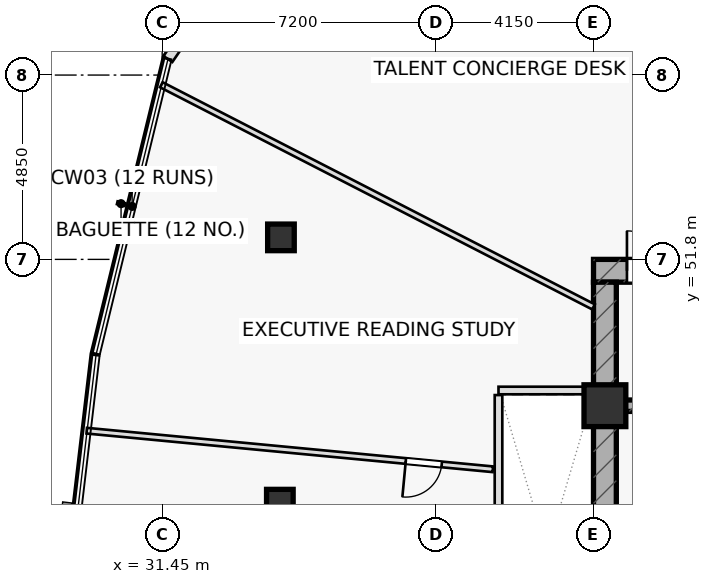
"""IFC4 building model, lengths in metres.
Left out: names, types, materials, properties, quantities, classifications, styles, units other than length and angle.
Written with IfcOpenShell. Run it as: python <this file> out.ifc"""

import sys

from ifc_helpers import new_model, si_unit, direction, frame, frame_2d, origin, origin_2d, place, context, subcontext, project, spatial, rectangle, hollow_rectangle, extrude, element, fill, save


model = new_model("IFC4")
c1 = context("Model", 3, precision=1e-05, world=origin(), true_north=direction((0.0, 1.0)))
c2 = subcontext(c1, "Body", "Model", "MODEL_VIEW")
j1 = project(units=[si_unit("LENGTHUNIT", "METRE"), si_unit("PLANEANGLEUNIT", "RADIAN")], contexts=[c1])
p1 = place(None, origin())
s1 = spatial("IfcSite", under=j1, at=p1, CompositionType="ELEMENT")
p2 = place(p1, origin())
s2 = spatial("IfcBuilding", under=s1, at=p2, CompositionType="ELEMENT")
p3 = place(p2, frame((0.0, 0.0, 115.6)))
s3 = spatial("IfcBuildingStorey", under=s2, at=p3, CompositionType="ELEMENT", Elevation=115.6)
p4 = place(p3, frame((42.8, 51.5, 0.0), z_axis=(0.0, 0.0, 1.0), x_axis=(1.0, 0.0, 0.0)))
e1 = element("IfcWall", 1, at=p4, inside=s3, PredefinedType="SHEAR", context=c2, shape_type="SweptSolid", body=[
    extrude(rectangle(XDim=14.4, YDim=0.6, at=frame_2d((7.2, 0.0))), origin(), (0.0, 0.0, 1.0), 3.55),
])
p5 = place(p4, frame((0.88, 0.0, 0.0)))
e2 = element("IfcOpeningElement", 2, at=p5, cuts=e1, PredefinedType="OPENING", context=c2, shape_type="SweptSolid", body=[
    extrude(rectangle(XDim=1.05, YDim=2.2, at=frame_2d((0.525, 1.1))), frame((0.0, 0.31, 0.0), z_axis=(0.0, -1.0, 0.0), x_axis=(1.0, 0.0, 0.0)), (0.0, 0.0, 1.0), 0.62),
])
p6 = place(p3, frame((43.1, 38.8, 0.0), z_axis=(0.0, 0.0, 1.0), x_axis=(0.0, 1.0, 0.0)))
e3 = element("IfcWall", 3, at=p6, inside=s3, PredefinedType="SHEAR", context=c2, shape_type="SweptSolid", body=[
    extrude(rectangle(XDim=12.4, YDim=0.6, at=frame_2d((6.2, 0.0))), origin(), (0.0, 0.0, 1.0), 3.55),
])
p7 = place(p3, frame((43.4, 47.95, 0.0), z_axis=(0.0, 0.0, 1.0), x_axis=(1.0, 0.0, 0.0)))
e4 = element("IfcWall", 4, at=p7, inside=s3, PredefinedType="SHEAR", context=c2, shape_type="SweptSolid", body=[
    extrude(rectangle(XDim=13.2, YDim=0.3, at=frame_2d((6.6, 0.0))), origin(), (0.0, 0.0, 1.0), 3.55),
])
p8 = place(p7, frame((8.345, 0.0, 0.0)))
e5 = element("IfcOpeningElement", 5, at=p8, cuts=e4, PredefinedType="OPENING", context=c2, shape_type="SweptSolid", body=[
    extrude(rectangle(XDim=1.15, YDim=2.2, at=frame_2d((0.575, 1.1))), frame((0.0, 0.16, 0.0), z_axis=(0.0, -1.0, 0.0), x_axis=(1.0, 0.0, 0.0)), (0.0, 0.0, 1.0), 0.32),
])
p9 = place(p7, frame((10.065, 0.0, 0.0)))
e6 = element("IfcOpeningElement", 6, at=p9, cuts=e4, PredefinedType="OPENING", context=c2, shape_type="SweptSolid", body=[
    extrude(rectangle(XDim=1.15, YDim=2.2, at=frame_2d((0.575, 1.1))), frame((0.0, 0.16, 0.0), z_axis=(0.0, -1.0, 0.0), x_axis=(1.0, 0.0, 0.0)), (0.0, 0.0, 1.0), 0.32),
])
p10 = place(p7, frame((11.645, 0.0, 0.0)))
e7 = element("IfcOpeningElement", 7, at=p10, cuts=e4, PredefinedType="OPENING", context=c2, shape_type="SweptSolid", body=[
    extrude(rectangle(XDim=1.15, YDim=2.2, at=frame_2d((0.575, 1.1))), frame((0.0, 0.16, 0.0), z_axis=(0.0, -1.0, 0.0), x_axis=(1.0, 0.0, 0.0)), (0.0, 0.0, 1.0), 0.32),
])
p11 = place(p3, frame((43.1, 47.95, 0.0), z_axis=(0.0, 0.0, 1.0), x_axis=(1.0, 0.0, 0.0)))
e8 = element("IfcColumn", 8, at=p11, inside=s3, PredefinedType="COLUMN", context=c2, shape_type="SweptSolid", body=[
    extrude(rectangle(XDim=1.1, YDim=1.1, at=origin_2d()), origin(), (0.0, 0.0, 1.0), 3.55),
])
for number, where, z_axis, x_axis in (
    (9, (34.575, 52.379, 0.0), (0.0, 0.0, 1.0), (1.0, 0.0, 0.0)),
    (10, (34.546, 45.399, 0.0), (0.0, 0.0, 1.0), (1.0, 0.0, 0.0)),
):
    element("IfcColumn", number, at=place(p3, frame(where, z_axis=z_axis, x_axis=x_axis)), inside=s3, PredefinedType="COLUMN", context=c2, shape_type="SweptSolid", body=[
        extrude(hollow_rectangle(XDim=0.7, YDim=0.7, WallThickness=0.04, at=origin_2d()), origin(), (0.0, 0.0, 1.0), 3.55),
    ])
p12 = place(p3, frame((40.3, 48.35, 0.0), z_axis=(0.0, 0.0, 1.0), x_axis=(1.0, 0.0, 0.0)))
e11 = element("IfcWall", 11, at=p12, inside=s3, PredefinedType="PARTITIONING", context=c2, shape_type="SweptSolid", body=[
    extrude(rectangle(XDim=2.5, YDim=0.2, at=frame_2d((1.25, 0.0))), origin(), (0.0, 0.0, 1.0), 3.55),
])
p13 = place(p3, frame((47.198, 54.45, 0.0), z_axis=(0.0, 0.0, 1.0), x_axis=(-0.560884082232, 0.827894344889, 0.0)))
e12 = element("IfcWall", 12, at=p13, inside=s3, PredefinedType="PARTITIONING", context=c2, shape_type="SweptSolid", body=[
    extrude(rectangle(XDim=15.922, YDim=0.15, at=frame_2d((7.961, 0.0))), origin(), (0.0, 0.0, 1.0), 2.835),
])
p14 = place(p13, frame((1.35, 0.0, 0.0)))
e13 = element("IfcOpeningElement", 13, at=p14, cuts=e12, PredefinedType="OPENING", context=c2, shape_type="SweptSolid", body=[
    extrude(rectangle(XDim=0.95, YDim=2.05, at=frame_2d((0.475, 1.025))), frame((0.0, 0.085, 0.0), z_axis=(0.0, -1.0, 0.0), x_axis=(1.0, 0.0, 0.0)), (0.0, 0.0, 1.0), 0.17),
])
p15 = place(p3, frame((42.8, 50.55, 0.0), z_axis=(0.0, 0.0, 1.0), x_axis=(-0.889423329843, 0.457084390819, 0.0)))
e14 = element("IfcWall", 14, at=p15, inside=s3, PredefinedType="PARTITIONING", context=c2, shape_type="SweptSolid", body=[
    extrude(rectangle(XDim=12.786, YDim=0.15, at=frame_2d((6.393, 0.0))), origin(), (0.0, 0.0, 1.0), 2.835),
])
p16 = place(p3, frame((40.15, 46.278, 0.0), z_axis=(0.0, 0.0, 1.0), x_axis=(-0.995517526957, 0.09457723575, 0.0)))
e15 = element("IfcWall", 15, at=p16, inside=s3, PredefinedType="PARTITIONING", context=c2, shape_type="SweptSolid", body=[
    extrude(rectangle(XDim=10.733, YDim=0.15, at=frame_2d((5.367, 0.0))), origin(), (0.0, 0.0, 1.0), 2.835),
])
p17 = place(p16, frame((1.35, 0.0, 0.0)))
e16 = element("IfcOpeningElement", 16, at=p17, cuts=e15, PredefinedType="OPENING", context=c2, shape_type="SweptSolid", body=[
    extrude(rectangle(XDim=0.95, YDim=2.05, at=frame_2d((0.475, 1.025))), frame((0.0, 0.085, 0.0), z_axis=(0.0, -1.0, 0.0), x_axis=(1.0, 0.0, 0.0)), (0.0, 0.0, 1.0), 0.17),
])
p18 = place(p3, frame((36.5, 64.224, 0.0), z_axis=(0.0, 0.0, 1.0), x_axis=(-0.56512603043, -0.825004587703, 0.0)))
e17 = element("IfcWall", 17, at=p18, inside=s3, PredefinedType="STANDARD", context=c2, shape_type="SweptSolid", body=[
    extrude(rectangle(XDim=8.669, YDim=0.28, at=frame_2d((4.334, 0.0))), origin(), (0.0, 0.0, 1.0), 3.55),
])
p19 = place(p3, frame((40.3, 40.02, 0.0), z_axis=(0.0, 0.0, 1.0), x_axis=(0.0, 1.0, 0.0)))
e18 = element("IfcWall", 18, at=p19, inside=s3, PredefinedType="PARTITIONING", context=c2, shape_type="SweptSolid", body=[
    extrude(rectangle(XDim=8.21, YDim=0.2, at=frame_2d((4.105, 0.0))), origin(), (0.0, 0.0, 1.0), 3.55),
])
p20 = place(p5, origin())
e19 = element("IfcDoor", 19, at=p20, inside=s3, OperationType="SINGLE_SWING_LEFT", PredefinedType="DOOR", context=c2, shape_type="SweptSolid", body=[
    extrude(rectangle(XDim=1.05, YDim=2.2, at=frame_2d((0.525, 1.1))), frame((0.0, 0.025, 0.0), z_axis=(0.0, -1.0, 0.0), x_axis=(1.0, 0.0, 0.0)), (0.0, 0.0, 1.0), 0.05),
])
fill(e2, e19)
p21 = place(p17, origin())
e20 = element("IfcDoor", 20, at=p21, inside=s3, OperationType="SINGLE_SWING_RIGHT", PredefinedType="DOOR", context=c2, shape_type="SweptSolid", body=[
    extrude(rectangle(XDim=0.95, YDim=2.05, at=frame_2d((0.475, 1.025))), frame((0.0, 0.025, 0.0), z_axis=(0.0, -1.0, 0.0), x_axis=(1.0, 0.0, 0.0)), (0.0, 0.0, 1.0), 0.05),
])
fill(e16, e20)
save(model, sys.argv[1])
